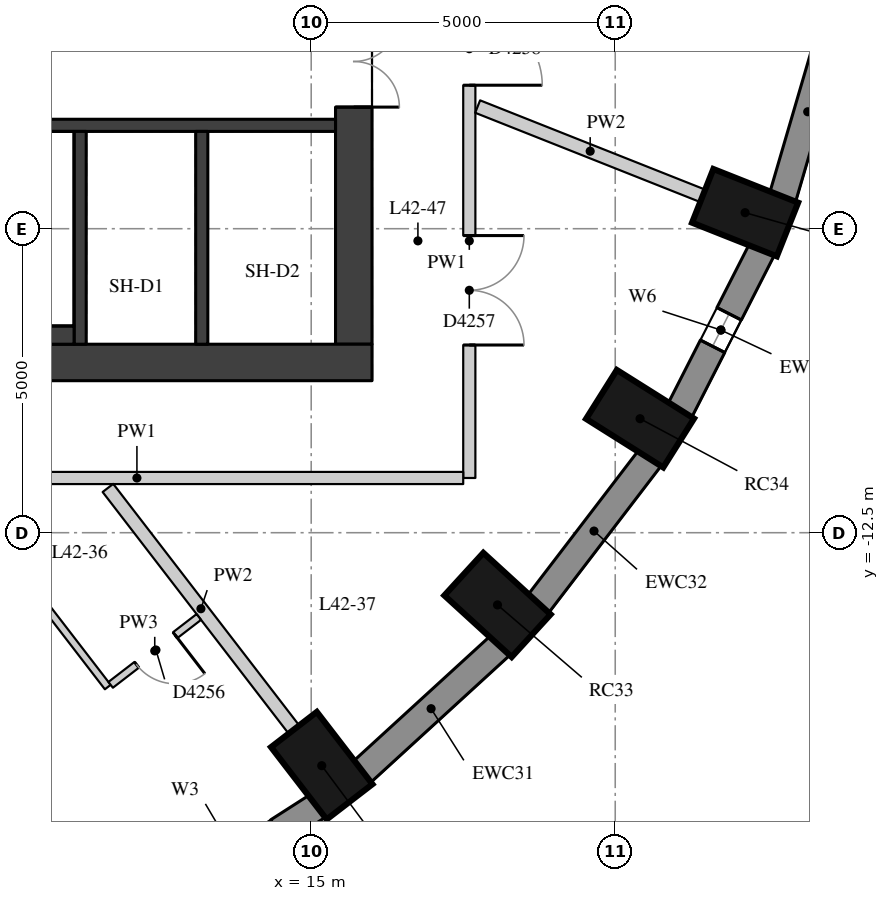
"""IFC4 building model, lengths in metres.
Left out: names, types, materials, properties, quantities, classifications, styles, units other than length and angle.
Written with IfcOpenShell. Run it as: python <this file> out.ifc"""

import sys

from ifc_helpers import new_model, si_unit, direction, frame, frame_2d, origin, origin_2d, place, context, subcontext, project, spatial, rectangle, extrude, element, fill, save


model = new_model("IFC4")
c1 = context("Model", 3, precision=1e-05, world=origin(), true_north=direction((0.0, 1.0)))
c2 = subcontext(c1, "Body", "Model", "MODEL_VIEW")
j1 = project(units=[si_unit("LENGTHUNIT", "METRE"), si_unit("PLANEANGLEUNIT", "RADIAN")], contexts=[c1])
p1 = place(None, origin())
s1 = spatial("IfcSite", under=j1, at=p1, CompositionType="ELEMENT")
p2 = place(p1, origin())
s2 = spatial("IfcBuilding", under=s1, at=p2, CompositionType="ELEMENT")
p3 = place(p2, frame((0.0, 0.0, 151.7)))
s3 = spatial("IfcBuildingStorey", under=s2, at=p3, CompositionType="ELEMENT", Elevation=151.7)
for number, where, z_axis, x_axis in (
    (1, (15.173, -16.332, 0.0), (0.0, 0.0, 1.0), (0.61, -0.792, 0.0)),
    (2, (18.064, -13.688, 0.0), (0.0, 0.0, 1.0), (0.738, -0.675, 0.0)),
    (3, (20.408, -10.625, 0.0), (0.0, 0.0, 1.0), (0.846, -0.533, 0.0)),
    (4, (22.136, -7.236, 0.0), (0.0, 0.0, 1.0), (0.93, -0.369, 0.0)),
):
    element("IfcColumn", number, at=place(p3, frame(where, z_axis=z_axis, x_axis=x_axis)), inside=s3, PredefinedType="COLUMN", context=c2, shape_type="SweptSolid", body=[
        extrude(rectangle(XDim=1.5, YDim=0.95, at=origin_2d()), origin(), (0.0, 0.0, 1.0), 3.3),
    ])
p4 = place(p3, frame((12.455, -18.693, 0.0), z_axis=(0.0, 0.0, 1.0), x_axis=(0.842065914439, 0.539374633943, 0.0)))
e5 = element("IfcWall", 5, at=p4, inside=s3, PredefinedType="SOLIDWALL", context=c2, shape_type="SweptSolid", body=[
    extrude(rectangle(XDim=3.151, YDim=0.45, at=frame_2d((1.576, 0.0))), origin(), (0.0, 0.0, 1.0), 3.02),
])
p5 = place(p4, frame((0.776, 0.0, 0.4)))
e6 = element("IfcOpeningElement", 6, at=p5, cuts=e5, PredefinedType="OPENING", context=c2, shape_type="SweptSolid", body=[
    extrude(rectangle(XDim=1.6, YDim=1.75, at=frame_2d((0.8, 0.875))), frame((0.0, 0.235, 0.0), z_axis=(0.0, -1.0, 0.0), x_axis=(1.0, 0.0, 0.0)), (0.0, 0.0, 1.0), 0.47),
])
p6 = place(p3, frame((15.83, -16.439, 0.0), z_axis=(0.0, 0.0, 1.0), x_axis=(0.737808755941, 0.675009807082, 0.0)))
e7 = element("IfcWall", 7, at=p6, inside=s3, PredefinedType="SOLIDWALL", context=c2, shape_type="SweptSolid", body=[
    extrude(rectangle(XDim=3.094, YDim=0.45, at=frame_2d((1.547, 0.0))), origin(), (0.0, 0.0, 1.0), 3.02),
])
p7 = place(p3, frame((18.728, -13.679, 0.0), z_axis=(0.0, 0.0, 1.0), x_axis=(0.607817056371, 0.794077090706, 0.0)))
e8 = element("IfcWall", 8, at=p7, inside=s3, PredefinedType="SOLIDWALL", context=c2, shape_type="SweptSolid", body=[
    extrude(rectangle(XDim=3.037, YDim=0.45, at=frame_2d((1.519, 0.0))), origin(), (0.0, 0.0, 1.0), 3.02),
])
p8 = place(p3, frame((21.059, -10.497, 0.0), z_axis=(0.0, 0.0, 1.0), x_axis=(0.454133999889, 0.890933392653, 0.0)))
e9 = element("IfcWall", 9, at=p8, inside=s3, PredefinedType="SOLIDWALL", context=c2, shape_type="SweptSolid", body=[
    extrude(rectangle(XDim=2.986, YDim=0.45, at=frame_2d((1.493, 0.0))), origin(), (0.0, 0.0, 1.0), 3.02),
])
p9 = place(p8, frame((1.193, 0.0, 0.4)))
e10 = element("IfcOpeningElement", 10, at=p9, cuts=e9, PredefinedType="OPENING", context=c2, shape_type="SweptSolid", body=[
    extrude(rectangle(XDim=0.6, YDim=1.75, at=frame_2d((0.3, 0.875))), frame((0.0, 0.235, 0.0), z_axis=(0.0, -1.0, 0.0), x_axis=(1.0, 0.0, 0.0)), (0.0, 0.0, 1.0), 0.47),
])
p10 = place(p3, frame((22.751, -6.991, 0.0), z_axis=(0.0, 0.0, 1.0), x_axis=(0.281049481624, 0.959693278542, 0.0)))
e11 = element("IfcWall", 11, at=p10, inside=s3, PredefinedType="SOLIDWALL", context=c2, shape_type="SweptSolid", body=[
    extrude(rectangle(XDim=2.948, YDim=0.45, at=frame_2d((1.474, 0.0))), origin(), (0.0, 0.0, 1.0), 3.02),
])
p11 = place(p3, frame((15.7, -9.4, 0.0), z_axis=(0.0, 0.0, 1.0), x_axis=(0.0, 1.0, 0.0)))
e12 = element("IfcWall", 12, at=p11, inside=s3, PredefinedType="SHEAR", context=c2, shape_type="SweptSolid", body=[
    extrude(rectangle(XDim=18.8, YDim=0.6, at=frame_2d((9.4, 0.0))), origin(), (0.0, 0.0, 1.0), 3.02),
])
p12 = place(p11, frame((13.4, 0.0, 0.0)))
e13 = element("IfcOpeningElement", 13, at=p12, cuts=e12, PredefinedType="OPENING", context=c2, shape_type="SweptSolid", body=[
    extrude(rectangle(XDim=1.5, YDim=2.1, at=frame_2d((0.75, 1.05))), frame((0.0, 0.31, 0.0), z_axis=(0.0, -1.0, 0.0), x_axis=(1.0, 0.0, 0.0)), (0.0, 0.0, 1.0), 0.62),
])
p13 = place(p11, frame((3.9, 0.0, 0.0)))
e14 = element("IfcOpeningElement", 14, at=p13, cuts=e12, PredefinedType="OPENING", context=c2, shape_type="SweptSolid", body=[
    extrude(rectangle(XDim=1.5, YDim=2.1, at=frame_2d((0.75, 1.05))), frame((0.0, 0.31, 0.0), z_axis=(0.0, -1.0, 0.0), x_axis=(1.0, 0.0, 0.0)), (0.0, 0.0, 1.0), 0.62),
])
p14 = place(p3, frame((4.0, -9.7, 0.0), z_axis=(0.0, 0.0, 1.0), x_axis=(1.0, 0.0, 0.0)))
e15 = element("IfcWall", 15, at=p14, inside=s3, PredefinedType="SHEAR", context=c2, shape_type="SweptSolid", body=[
    extrude(rectangle(XDim=12.0, YDim=0.6, at=frame_2d((6.0, 0.0))), origin(), (0.0, 0.0, 1.0), 3.02),
])
p15 = place(p3, frame((4.6, -5.8, 0.0), z_axis=(0.0, 0.0, 1.0), x_axis=(1.0, 0.0, 0.0)))
e16 = element("IfcWall", 16, at=p15, inside=s3, PredefinedType="SHEAR", context=c2, shape_type="SweptSolid", body=[
    extrude(rectangle(XDim=10.8, YDim=0.2, at=frame_2d((5.4, 0.0))), origin(), (0.0, 0.0, 1.0), 3.02),
])
for number, where, z_axis, x_axis in (
    (17, (11.2, -9.4, 0.0), (0.0, 0.0, 1.0), (0.0, 1.0, 0.0)),
    (18, (13.2, -9.4, 0.0), (0.0, 0.0, 1.0), (0.0, 1.0, 0.0)),
):
    element("IfcWall", number, at=place(p3, frame(where, z_axis=z_axis, x_axis=x_axis)), inside=s3, PredefinedType="SHEAR", context=c2, shape_type="SweptSolid", body=[
        extrude(rectangle(XDim=3.5, YDim=0.2, at=frame_2d((1.75, 0.0))), origin(), (0.0, 0.0, 1.0), 3.02),
    ])
p16 = place(p3, frame((6.22, -9.25, 0.0), z_axis=(0.0, 0.0, 1.0), x_axis=(1.0, 0.0, 0.0)))
e19 = element("IfcWall", 19, at=p16, inside=s3, PredefinedType="PARTITIONING", context=c2, shape_type="SweptSolid", body=[
    extrude(rectangle(XDim=4.88, YDim=0.3, at=frame_2d((2.44, 0.0))), origin(), (0.0, 0.0, 1.0), 3.02),
])
p17 = place(p3, frame((17.6, -3.8, 0.0), z_axis=(0.0, 0.0, 1.0), x_axis=(0.0, -1.0, 0.0)))
e20 = element("IfcWall", 20, at=p17, inside=s3, PredefinedType="PARTITIONING", context=c2, shape_type="SweptSolid", body=[
    extrude(rectangle(XDim=7.8, YDim=0.2, at=frame_2d((3.9, 0.0))), origin(), (0.0, 0.0, 1.0), 3.02),
])
p18 = place(p17, frame((3.813, 0.0, 0.0)))
e21 = element("IfcOpeningElement", 21, at=p18, cuts=e20, PredefinedType="OPENING", context=c2, shape_type="SweptSolid", body=[
    extrude(rectangle(XDim=1.8, YDim=2.1, at=frame_2d((0.9, 1.05))), frame((0.0, 0.11, 0.0), z_axis=(0.0, -1.0, 0.0), x_axis=(1.0, 0.0, 0.0)), (0.0, 0.0, 1.0), 0.22),
])
p19 = place(p17, frame((0.14, 0.0, 0.0)))
e22 = element("IfcOpeningElement", 22, at=p19, cuts=e20, PredefinedType="OPENING", context=c2, shape_type="SweptSolid", body=[
    extrude(rectangle(XDim=1.2, YDim=2.1, at=frame_2d((0.6, 1.05))), frame((0.0, 0.11, 0.0), z_axis=(0.0, -1.0, 0.0), x_axis=(1.0, 0.0, 0.0)), (0.0, 0.0, 1.0), 0.22),
])
p20 = place(p3, frame((17.5, -11.6, 0.0), z_axis=(0.0, 0.0, 1.0), x_axis=(-1.0, 0.0, 0.0)))
e23 = element("IfcWall", 23, at=p20, inside=s3, PredefinedType="PARTITIONING", context=c2, shape_type="SweptSolid", body=[
    extrude(rectangle(XDim=10.732, YDim=0.2, at=frame_2d((5.366, 0.0))), origin(), (0.0, 0.0, 1.0), 3.02),
])
p21 = place(p3, frame((14.716, -15.737, 0.0), z_axis=(0.0, 0.0, 1.0), x_axis=(-0.609986007715, 0.792412184657, 0.0)))
e24 = element("IfcWall", 24, at=p21, inside=s3, PredefinedType="PARTITIONING", context=c2, shape_type="SweptSolid", body=[
    extrude(rectangle(XDim=5.015, YDim=0.22, at=frame_2d((2.507, 0.0))), origin(), (0.0, 0.0, 1.0), 3.02),
])
p22 = place(p3, frame((21.439, -6.96, 0.0), z_axis=(0.0, 0.0, 1.0), x_axis=(-0.929517399972, 0.368778257426, 0.0)))
e25 = element("IfcWall", 25, at=p22, inside=s3, PredefinedType="PARTITIONING", context=c2, shape_type="SweptSolid", body=[
    extrude(rectangle(XDim=3.982, YDim=0.22, at=frame_2d((1.991, 0.0))), origin(), (0.0, 0.0, 1.0), 3.02),
])
p23 = place(p3, frame((9.109, -11.732, 0.0), z_axis=(0.0, 0.0, 1.0), x_axis=(0.609996270026, -0.79240428479, 0.0)))
e26 = element("IfcWall", 26, at=p23, inside=s3, PredefinedType="PARTITIONING", context=c2, shape_type="SweptSolid", body=[
    extrude(rectangle(XDim=4.173, YDim=0.12, at=frame_2d((2.087, 0.0))), origin(), (0.0, 0.0, 1.0), 3.02),
])
p24 = place(p3, frame((11.702, -15.002, 0.0), z_axis=(0.0, 0.0, 1.0), x_axis=(0.792395776304, 0.610007322657, 0.0)))
e27 = element("IfcWall", 27, at=p24, inside=s3, PredefinedType="PARTITIONING", context=c2, shape_type="SweptSolid", body=[
    extrude(rectangle(XDim=1.83, YDim=0.12, at=frame_2d((0.915, 0.0))), origin(), (0.0, 0.0, 1.0), 3.02),
])
p25 = place(p24, frame((0.54, 0.0, 0.0)))
e28 = element("IfcOpeningElement", 28, at=p25, cuts=e27, PredefinedType="OPENING", context=c2, shape_type="SweptSolid", body=[
    extrude(rectangle(XDim=0.8, YDim=2.1, at=frame_2d((0.4, 1.05))), frame((0.0, 0.07, 0.0), z_axis=(0.0, -1.0, 0.0), x_axis=(1.0, 0.0, 0.0)), (0.0, 0.0, 1.0), 0.14),
])
p26 = place(p9, origin())
e29 = element("IfcWindow", 29, at=p26, inside=s3, PartitioningType="SINGLE_PANEL", PredefinedType="WINDOW", context=c2, shape_type="SweptSolid", body=[
    extrude(rectangle(XDim=0.6, YDim=1.75, at=frame_2d((0.3, 0.875))), frame((0.0, 0.035, 0.0), z_axis=(0.0, -1.0, 0.0), x_axis=(1.0, 0.0, 0.0)), (0.0, 0.0, 1.0), 0.06),
])
fill(e10, e29)
p27 = place(p13, origin())
e30 = element("IfcDoor", 30, at=p27, inside=s3, OperationType="DOUBLE_DOOR_SINGLE_SWING", PredefinedType="DOOR", context=c2, shape_type="SweptSolid", body=[
    extrude(rectangle(XDim=1.5, YDim=2.1, at=frame_2d((0.75, 1.05))), frame((0.0, 0.025, 0.0), z_axis=(0.0, -1.0, 0.0), x_axis=(1.0, 0.0, 0.0)), (0.0, 0.0, 1.0), 0.05),
])
fill(e14, e30)
p28 = place(p25, origin())
e31 = element("IfcDoor", 31, at=p28, inside=s3, OperationType="SINGLE_SWING_LEFT", PredefinedType="DOOR", context=c2, shape_type="SweptSolid", body=[
    extrude(rectangle(XDim=0.8, YDim=2.1, at=frame_2d((0.4, 1.05))), frame((0.0, 0.025, 0.0), z_axis=(0.0, -1.0, 0.0), x_axis=(1.0, 0.0, 0.0)), (0.0, 0.0, 1.0), 0.05),
])
fill(e28, e31)
p29 = place(p18, origin())
e32 = element("IfcDoor", 32, at=p29, inside=s3, OperationType="DOUBLE_DOOR_SINGLE_SWING", PredefinedType="DOOR", context=c2, shape_type="SweptSolid", body=[
    extrude(rectangle(XDim=1.8, YDim=2.1, at=frame_2d((0.9, 1.05))), frame((0.0, 0.025, 0.0), z_axis=(0.0, -1.0, 0.0), x_axis=(1.0, 0.0, 0.0)), (0.0, 0.0, 1.0), 0.05),
])
fill(e21, e32)
p30 = place(p19, origin())
e33 = element("IfcDoor", 33, at=p30, inside=s3, OperationType="SINGLE_SWING_RIGHT", PredefinedType="DOOR", context=c2, shape_type="SweptSolid", body=[
    extrude(rectangle(XDim=1.2, YDim=2.1, at=frame_2d((0.6, 1.05))), frame((0.0, 0.025, 0.0), z_axis=(0.0, -1.0, 0.0), x_axis=(1.0, 0.0, 0.0)), (0.0, 0.0, 1.0), 0.05),
])
fill(e22, e33)
save(model, sys.argv[1])
